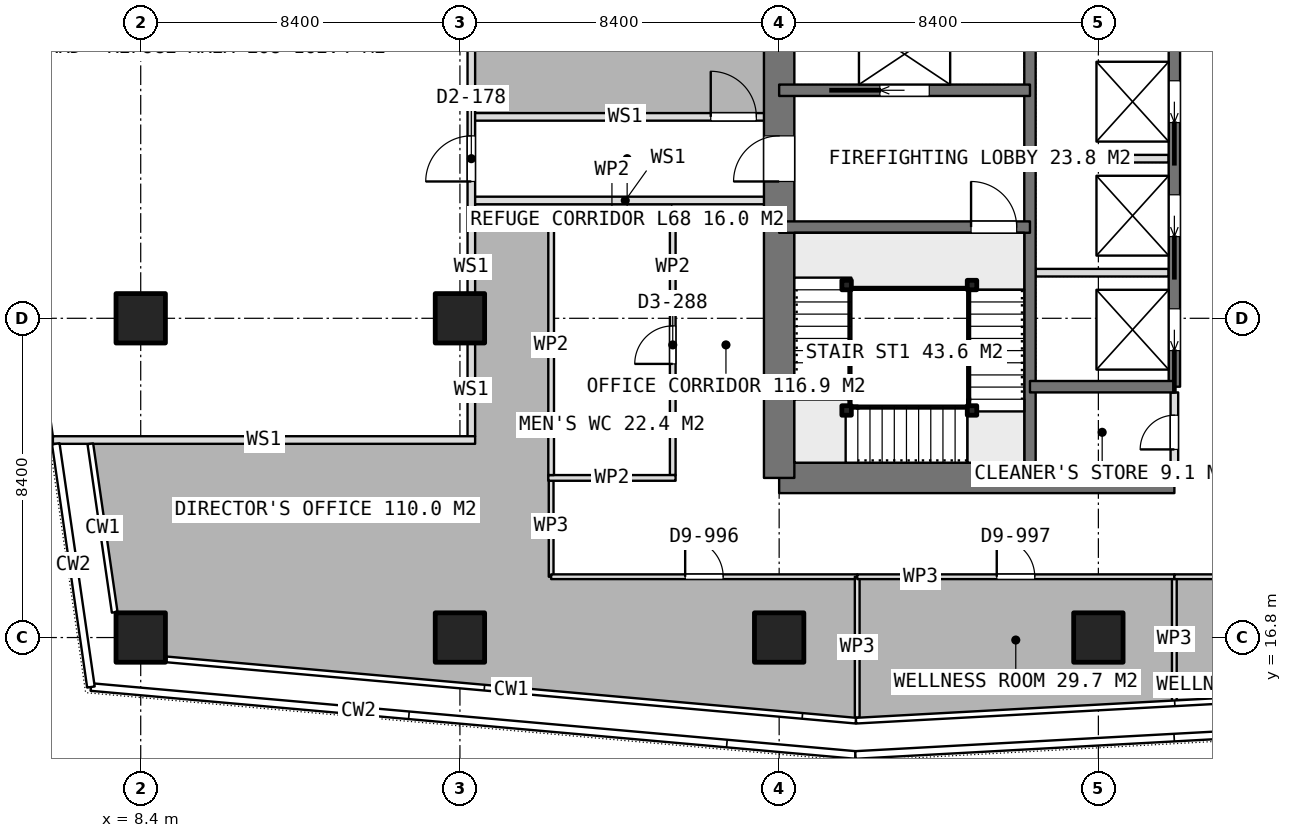
"""IFC4 building model, lengths in metres.
Left out: names, types, materials, properties, quantities, classifications, styles, units other than length and angle.
Written with IfcOpenShell. Run it as: python <this file> out.ifc"""

import sys

from ifc_helpers import new_model, si_unit, direction, frame, frame_2d, origin, origin_2d, place, context, subcontext, project, spatial, rectangle, extrude, element, fill, save


model = new_model("IFC4")
c1 = context("Model", 3, precision=1e-05, world=origin(), true_north=direction((0.0, 1.0)))
c2 = subcontext(c1, "Body", "Model", "MODEL_VIEW")
j1 = project(units=[si_unit("LENGTHUNIT", "METRE"), si_unit("PLANEANGLEUNIT", "RADIAN")], contexts=[c1])
p1 = place(None, origin())
s1 = spatial("IfcSite", under=j1, at=p1, CompositionType="ELEMENT")
p2 = place(p1, origin())
s2 = spatial("IfcBuilding", under=s1, at=p2, CompositionType="ELEMENT")
p3 = place(p2, frame((0.0, 0.0, 268.85)))
s3 = spatial("IfcBuildingStorey", under=s2, at=p3, CompositionType="ELEMENT", Elevation=268.85)
p4 = place(p3, frame((25.2, 21.0, 0.0), z_axis=(0.0, 0.0, 1.0), x_axis=(1.0, 0.0, 0.0)))
e1 = element("IfcWall", 1, at=p4, inside=s3, PredefinedType="SHEAR", context=c2, shape_type="SweptSolid", body=[
    extrude(rectangle(XDim=10.4, YDim=0.8, at=frame_2d((5.2, 0.0))), origin(), (0.0, 0.0, 1.0), 3.75),
])
p5 = place(p3, frame((25.2, 21.0, 0.0), z_axis=(0.0, 0.0, 1.0), x_axis=(0.0, 1.0, 0.0)))
e2 = element("IfcWall", 2, at=p5, inside=s3, PredefinedType="SHEAR", context=c2, shape_type="SweptSolid", body=[
    extrude(rectangle(XDim=25.2, YDim=0.8, at=frame_2d((12.6, 0.0))), origin(), (0.0, 0.0, 1.0), 3.75),
])
p6 = place(p5, frame((7.8, 0.0, 0.0)))
e3 = element("IfcOpeningElement", 3, at=p6, cuts=e2, PredefinedType="OPENING", context=c2, shape_type="SweptSolid", body=[
    extrude(rectangle(XDim=1.2, YDim=2.1, at=frame_2d((0.6, 1.05))), frame((0.0, 0.41, 0.0), z_axis=(0.0, -1.0, 0.0), x_axis=(1.0, 0.0, 0.0)), (0.0, 0.0, 1.0), 0.82),
])
p7 = place(p5, frame((14.25, 0.0, 0.0)))
e4 = element("IfcOpeningElement", 4, at=p7, cuts=e2, PredefinedType="OPENING", context=c2, shape_type="SweptSolid", body=[
    extrude(rectangle(XDim=0.9, YDim=2.1, at=frame_2d((0.45, 1.05))), frame((0.0, 0.41, 0.0), z_axis=(0.0, -1.0, 0.0), x_axis=(1.0, 0.0, 0.0)), (0.0, 0.0, 1.0), 0.82),
])
p8 = place(p5, frame((16.85, 0.0, 0.0)))
e5 = element("IfcOpeningElement", 5, at=p8, cuts=e2, PredefinedType="OPENING", context=c2, shape_type="SweptSolid", body=[
    extrude(rectangle(XDim=0.9, YDim=2.1, at=frame_2d((0.45, 1.05))), frame((0.0, 0.41, 0.0), z_axis=(0.0, -1.0, 0.0), x_axis=(1.0, 0.0, 0.0)), (0.0, 0.0, 1.0), 0.82),
])
p9 = place(p5, frame((18.95, 0.0, 0.0)))
e6 = element("IfcOpeningElement", 6, at=p9, cuts=e2, PredefinedType="OPENING", context=c2, shape_type="SweptSolid", body=[
    extrude(rectangle(XDim=1.2, YDim=2.1, at=frame_2d((0.6, 1.05))), frame((0.0, 0.41, 0.0), z_axis=(0.0, -1.0, 0.0), x_axis=(1.0, 0.0, 0.0)), (0.0, 0.0, 1.0), 0.82),
])
p10 = place(p3, frame((31.8, 21.0, 0.0), z_axis=(0.0, 0.0, 1.0), x_axis=(0.0, 1.0, 0.0)))
e7 = element("IfcWall", 7, at=p10, inside=s3, PredefinedType="SHEAR", context=c2, shape_type="SweptSolid", body=[
    extrude(rectangle(XDim=25.2, YDim=0.3, at=frame_2d((12.6, 0.0))), origin(), (0.0, 0.0, 1.0), 3.75),
])
p11 = place(p3, frame((35.6, 23.4, 0.0), z_axis=(0.0, 0.0, 1.0), x_axis=(0.0, 1.0, 0.0)))
e8 = element("IfcWall", 8, at=p11, inside=s3, PredefinedType="SHEAR", context=c2, shape_type="SweptSolid", body=[
    extrude(rectangle(XDim=18.0, YDim=0.3, at=frame_2d((9.0, 0.0))), origin(), (0.0, 0.0, 1.0), 3.75),
])
p12 = place(p11, frame((0.95, 0.0, 0.0)))
e9 = element("IfcOpeningElement", 9, at=p12, cuts=e8, PredefinedType="OPENING", context=c2, shape_type="SweptSolid", body=[
    extrude(rectangle(XDim=1.1, YDim=2.1, at=frame_2d((0.55, 1.05))), frame((0.0, 0.16, 0.0), z_axis=(0.0, -1.0, 0.0), x_axis=(1.0, 0.0, 0.0)), (0.0, 0.0, 1.0), 0.32),
])
p13 = place(p11, frame((3.95, 0.0, 0.0)))
e10 = element("IfcOpeningElement", 10, at=p13, cuts=e8, PredefinedType="OPENING", context=c2, shape_type="SweptSolid", body=[
    extrude(rectangle(XDim=1.1, YDim=2.1, at=frame_2d((0.55, 1.05))), frame((0.0, 0.16, 0.0), z_axis=(0.0, -1.0, 0.0), x_axis=(1.0, 0.0, 0.0)), (0.0, 0.0, 1.0), 0.32),
])
p14 = place(p11, frame((6.95, 0.0, 0.0)))
e11 = element("IfcOpeningElement", 11, at=p14, cuts=e8, PredefinedType="OPENING", context=c2, shape_type="SweptSolid", body=[
    extrude(rectangle(XDim=1.1, YDim=2.1, at=frame_2d((0.55, 1.05))), frame((0.0, 0.16, 0.0), z_axis=(0.0, -1.0, 0.0), x_axis=(1.0, 0.0, 0.0)), (0.0, 0.0, 1.0), 0.32),
])
p15 = place(p11, frame((9.95, 0.0, 0.0)))
e12 = element("IfcOpeningElement", 12, at=p15, cuts=e8, PredefinedType="OPENING", context=c2, shape_type="SweptSolid", body=[
    extrude(rectangle(XDim=1.1, YDim=2.1, at=frame_2d((0.55, 1.05))), frame((0.0, 0.16, 0.0), z_axis=(0.0, -1.0, 0.0), x_axis=(1.0, 0.0, 0.0)), (0.0, 0.0, 1.0), 0.32),
])
p16 = place(p11, frame((12.95, 0.0, 0.0)))
e13 = element("IfcOpeningElement", 13, at=p16, cuts=e8, PredefinedType="OPENING", context=c2, shape_type="SweptSolid", body=[
    extrude(rectangle(XDim=1.1, YDim=2.1, at=frame_2d((0.55, 1.05))), frame((0.0, 0.16, 0.0), z_axis=(0.0, -1.0, 0.0), x_axis=(1.0, 0.0, 0.0)), (0.0, 0.0, 1.0), 0.32),
])
p17 = place(p11, frame((15.95, 0.0, 0.0)))
e14 = element("IfcOpeningElement", 14, at=p17, cuts=e8, PredefinedType="OPENING", context=c2, shape_type="SweptSolid", body=[
    extrude(rectangle(XDim=1.1, YDim=2.1, at=frame_2d((0.55, 1.05))), frame((0.0, 0.16, 0.0), z_axis=(0.0, -1.0, 0.0), x_axis=(1.0, 0.0, 0.0)), (0.0, 0.0, 1.0), 0.32),
])
p18 = place(p3, frame((31.8, 23.4, 0.0), z_axis=(0.0, 0.0, 1.0), x_axis=(1.0, 0.0, 0.0)))
e15 = element("IfcWall", 15, at=p18, inside=s3, PredefinedType="SHEAR", context=c2, shape_type="SweptSolid", body=[
    extrude(rectangle(XDim=3.8, YDim=0.3, at=frame_2d((1.9, 0.0))), origin(), (0.0, 0.0, 1.0), 3.75),
])
p19 = place(p3, frame((25.2, 27.6, 0.0), z_axis=(0.0, 0.0, 1.0), x_axis=(1.0, 0.0, 0.0)))
e16 = element("IfcWall", 16, at=p19, inside=s3, PredefinedType="SHEAR", context=c2, shape_type="SweptSolid", body=[
    extrude(rectangle(XDim=6.6, YDim=0.3, at=frame_2d((3.3, 0.0))), origin(), (0.0, 0.0, 1.0), 3.75),
])
p20 = place(p19, frame((5.05, 0.0, 0.0)))
e17 = element("IfcOpeningElement", 17, at=p20, cuts=e16, PredefinedType="OPENING", context=c2, shape_type="SweptSolid", body=[
    extrude(rectangle(XDim=1.2, YDim=2.1, at=frame_2d((0.6, 1.05))), frame((0.0, 0.16, 0.0), z_axis=(0.0, -1.0, 0.0), x_axis=(1.0, 0.0, 0.0)), (0.0, 0.0, 1.0), 0.32),
])
p21 = place(p3, frame((25.2, 31.2, 0.0), z_axis=(0.0, 0.0, 1.0), x_axis=(1.0, 0.0, 0.0)))
e18 = element("IfcWall", 18, at=p21, inside=s3, PredefinedType="SHEAR", context=c2, shape_type="SweptSolid", body=[
    extrude(rectangle(XDim=6.6, YDim=0.3, at=frame_2d((3.3, 0.0))), origin(), (0.0, 0.0, 1.0), 3.75),
])
p22 = place(p21, frame((2.65, 0.0, 0.0)))
e19 = element("IfcOpeningElement", 19, at=p22, cuts=e18, PredefinedType="OPENING", context=c2, shape_type="SweptSolid", body=[
    extrude(rectangle(XDim=1.3, YDim=2.1, at=frame_2d((0.65, 1.05))), frame((0.0, 0.16, 0.0), z_axis=(0.0, -1.0, 0.0), x_axis=(1.0, 0.0, 0.0)), (0.0, 0.0, 1.0), 0.32),
])
for number, where, z_axis, x_axis in (
    (20, (8.4, 16.8, 0.0), (0.0, 0.0, 1.0), (1.0, 0.0, 0.0)),
    (21, (8.4, 25.2, 0.0), (0.0, 0.0, 1.0), (1.0, 0.0, 0.0)),
    (22, (16.8, 16.8, 0.0), (0.0, 0.0, 1.0), (1.0, 0.0, 0.0)),
    (23, (16.8, 25.2, 0.0), (0.0, 0.0, 1.0), (1.0, 0.0, 0.0)),
    (24, (25.2, 16.8, 0.0), (0.0, 0.0, 1.0), (1.0, 0.0, 0.0)),
    (25, (33.6, 16.8, 0.0), (0.0, 0.0, 1.0), (1.0, 0.0, 0.0)),
):
    element("IfcColumn", number, at=place(p3, frame(where, z_axis=z_axis, x_axis=x_axis)), inside=s3, PredefinedType="COLUMN", context=c2, shape_type="SweptSolid", body=[
        extrude(rectangle(XDim=1.3, YDim=1.3, at=origin_2d()), origin(), (0.0, 0.0, 1.0), 3.75),
    ])
for number, where, z_axis, x_axis in (
    (26, (31.95, 26.4, 0.0), (0.0, 0.0, 1.0), (1.0, 0.0, 0.0)),
    (27, (31.95, 29.4, 0.0), (0.0, 0.0, 1.0), (1.0, 0.0, 0.0)),
):
    element("IfcWall", number, at=place(p3, frame(where, z_axis=z_axis, x_axis=x_axis)), inside=s3, PredefinedType="PARTITIONING", context=c2, shape_type="SweptSolid", body=[
        extrude(rectangle(XDim=3.5, YDim=0.2, at=frame_2d((1.75, 0.0))), origin(), (0.0, 0.0, 1.0), 3.5),
    ])
p23 = place(p3, frame((35.6, 21.4, 0.0), z_axis=(0.0, 0.0, 1.0), x_axis=(0.0, 1.0, 0.0)))
e28 = element("IfcWall", 28, at=p23, inside=s3, PredefinedType="PARTITIONING", context=c2, shape_type="SweptSolid", body=[
    extrude(rectangle(XDim=1.85, YDim=0.2, at=frame_2d((0.925, 0.0))), origin(), (0.0, 0.0, 1.0), 3.5),
])
p24 = place(p23, frame((0.35, 0.0, 0.0)))
e29 = element("IfcOpeningElement", 29, at=p24, cuts=e28, PredefinedType="OPENING", context=c2, shape_type="SweptSolid", body=[
    extrude(rectangle(XDim=0.9, YDim=2.1, at=frame_2d((0.45, 1.05))), frame((0.0, 0.11, 0.0), z_axis=(0.0, -1.0, 0.0), x_axis=(1.0, 0.0, 0.0)), (0.0, 0.0, 1.0), 0.22),
])
for number, where, z_axis, x_axis in (
    (30, (19.125, 21.0, 0.0), (0.0, 0.0, 1.0), (1.0, 0.0, 0.0)),
    (31, (19.125, 28.0, 0.0), (0.0, 0.0, 1.0), (1.0, 0.0, 0.0)),
):
    element("IfcWall", number, at=place(p3, frame(where, z_axis=z_axis, x_axis=x_axis)), inside=s3, PredefinedType="PARTITIONING", context=c2, shape_type="SweptSolid", body=[
        extrude(rectangle(XDim=3.35, YDim=0.15, at=frame_2d((1.675, 0.0))), origin(), (0.0, 0.0, 1.0), 3.5),
    ])
p25 = place(p3, frame((19.2, 21.075, 0.0), z_axis=(0.0, 0.0, 1.0), x_axis=(0.0, 1.0, 0.0)))
e32 = element("IfcWall", 32, at=p25, inside=s3, PredefinedType="PARTITIONING", context=c2, shape_type="SweptSolid", body=[
    extrude(rectangle(XDim=6.85, YDim=0.15, at=frame_2d((3.425, 0.0))), origin(), (0.0, 0.0, 1.0), 3.5),
])
p26 = place(p3, frame((22.4, 21.075, 0.0), z_axis=(0.0, 0.0, 1.0), x_axis=(0.0, 1.0, 0.0)))
e33 = element("IfcWall", 33, at=p26, inside=s3, PredefinedType="PARTITIONING", context=c2, shape_type="SweptSolid", body=[
    extrude(rectangle(XDim=6.85, YDim=0.15, at=frame_2d((3.425, 0.0))), origin(), (0.0, 0.0, 1.0), 3.5),
])
p27 = place(p26, frame((2.925, 0.0, 0.0)))
e34 = element("IfcOpeningElement", 34, at=p27, cuts=e33, PredefinedType="OPENING", context=c2, shape_type="SweptSolid", body=[
    extrude(rectangle(XDim=1.0, YDim=2.1, at=frame_2d((0.5, 1.05))), frame((0.0, 0.085, 0.0), z_axis=(0.0, -1.0, 0.0), x_axis=(1.0, 0.0, 0.0)), (0.0, 0.0, 1.0), 0.17),
])
p28 = place(p3, frame((35.599, 15.119, 0.0), z_axis=(0.0, 0.0, 1.0), x_axis=(0.0, 1.0, 0.0)))
e35 = element("IfcWall", 35, at=p28, inside=s3, PredefinedType="PARTITIONING", context=c2, shape_type="SweptSolid", body=[
    extrude(rectangle(XDim=3.281, YDim=0.125, at=frame_2d((1.641, 0.0))), origin(), (0.0, 0.0, 1.0), 3.5),
])
p29 = place(p3, frame((35.599, 18.4, 0.0), z_axis=(0.0, 0.0, 1.0), x_axis=(1.0, 0.0, 0.0)))
e36 = element("IfcWall", 36, at=p29, inside=s3, PredefinedType="PARTITIONING", context=c2, shape_type="SweptSolid", body=[
    extrude(rectangle(XDim=7.074, YDim=0.125, at=frame_2d((3.537, 0.0))), origin(), (0.0, 0.0, 1.0), 3.5),
])
p30 = place(p29, frame((3.037, 0.0, 0.0)))
e37 = element("IfcOpeningElement", 37, at=p30, cuts=e36, PredefinedType="OPENING", context=c2, shape_type="SweptSolid", body=[
    extrude(rectangle(XDim=1.0, YDim=2.1, at=frame_2d((0.5, 1.05))), frame((0.0, 0.073, 0.0), z_axis=(0.0, -1.0, 0.0), x_axis=(1.0, 0.0, 0.0)), (0.0, 0.0, 1.0), 0.145),
])
p31 = place(p3, frame((19.2, 21.075, 0.0), z_axis=(0.0, 0.0, 1.0), x_axis=(0.0, -1.0, 0.0)))
e38 = element("IfcWall", 38, at=p31, inside=s3, PredefinedType="PARTITIONING", context=c2, shape_type="SweptSolid", body=[
    extrude(rectangle(XDim=2.675, YDim=0.125, at=frame_2d((1.337, 0.0))), origin(), (0.0, 0.0, 1.0), 3.5),
])
p32 = place(p3, frame((19.2, 18.4, 0.0), z_axis=(0.0, 0.0, 1.0), x_axis=(1.0, 0.0, 0.0)))
e39 = element("IfcWall", 39, at=p32, inside=s3, PredefinedType="PARTITIONING", context=c2, shape_type="SweptSolid", body=[
    extrude(rectangle(XDim=8.054, YDim=0.125, at=frame_2d((4.027, 0.0))), origin(), (0.0, 0.0, 1.0), 3.5),
])
p33 = place(p32, frame((3.527, 0.0, 0.0)))
e40 = element("IfcOpeningElement", 40, at=p33, cuts=e39, PredefinedType="OPENING", context=c2, shape_type="SweptSolid", body=[
    extrude(rectangle(XDim=1.0, YDim=2.1, at=frame_2d((0.5, 1.05))), frame((0.0, 0.073, 0.0), z_axis=(0.0, -1.0, 0.0), x_axis=(1.0, 0.0, 0.0)), (0.0, 0.0, 1.0), 0.145),
])
p34 = place(p3, frame((27.254, 18.4, 0.0), z_axis=(0.0, 0.0, 1.0), x_axis=(0.0, -1.0, 0.0)))
e41 = element("IfcWall", 41, at=p34, inside=s3, PredefinedType="PARTITIONING", context=c2, shape_type="SweptSolid", body=[
    extrude(rectangle(XDim=3.705, YDim=0.125, at=frame_2d((1.853, 0.0))), origin(), (0.0, 0.0, 1.0), 3.5),
])
p35 = place(p3, frame((27.255, 18.4, 0.0), z_axis=(0.0, 0.0, 1.0), x_axis=(1.0, 0.0, 0.0)))
e42 = element("IfcWall", 42, at=p35, inside=s3, PredefinedType="PARTITIONING", context=c2, shape_type="SweptSolid", body=[
    extrude(rectangle(XDim=8.343, YDim=0.125, at=frame_2d((4.171, 0.0))), origin(), (0.0, 0.0, 1.0), 3.5),
])
p36 = place(p35, frame((3.671, 0.0, 0.0)))
e43 = element("IfcOpeningElement", 43, at=p36, cuts=e42, PredefinedType="OPENING", context=c2, shape_type="SweptSolid", body=[
    extrude(rectangle(XDim=1.0, YDim=2.1, at=frame_2d((0.5, 1.05))), frame((0.0, 0.073, 0.0), z_axis=(0.0, -1.0, 0.0), x_axis=(1.0, 0.0, 0.0)), (0.0, 0.0, 1.0), 0.145),
])
for number, where, z_axis, x_axis in (
    (44, (30.275, 26.075, 0.0), (0.0, 0.0, 1.0), (1.0, 0.0, 0.0)),
    (45, (30.275, 22.775, 0.0), (0.0, 0.0, 1.0), (1.0, 0.0, 0.0)),
    (46, (26.975, 22.775, 0.0), (0.0, 0.0, 1.0), (1.0, 0.0, 0.0)),
    (47, (26.975, 26.075, 0.0), (0.0, 0.0, 1.0), (1.0, 0.0, 0.0)),
):
    element("IfcColumn", number, at=place(p3, frame(where, z_axis=z_axis, x_axis=x_axis)), inside=s3, PredefinedType="COLUMN", context=c2, shape_type="SweptSolid", body=[
        extrude(rectangle(XDim=0.25, YDim=0.25, at=origin_2d()), origin(), (0.0, 0.0, 1.0), 3.75),
    ])
p37 = place(p3, frame((17.1, 22.097, 0.0), z_axis=(0.0, 0.0, 1.0), x_axis=(0.0, 1.0, 0.0)))
e48 = element("IfcWall", 48, at=p37, inside=s3, PredefinedType="PARTITIONING", context=c2, shape_type="SweptSolid", body=[
    extrude(rectangle(XDim=2.453, YDim=0.2, at=frame_2d((1.227, 0.0))), origin(), (0.0, 0.0, 1.0), 3.5),
])
p38 = place(p3, frame((17.1, 25.85, 0.0), z_axis=(0.0, 0.0, 1.0), x_axis=(0.0, 1.0, 0.0)))
e49 = element("IfcWall", 49, at=p38, inside=s3, PredefinedType="PARTITIONING", context=c2, shape_type="SweptSolid", body=[
    extrude(rectangle(XDim=7.1, YDim=0.2, at=frame_2d((3.55, 0.0))), origin(), (0.0, 0.0, 1.0), 3.5),
])
p39 = place(p38, frame((2.95, 0.0, 0.0)))
e50 = element("IfcOpeningElement", 50, at=p39, cuts=e49, PredefinedType="OPENING", context=c2, shape_type="SweptSolid", body=[
    extrude(rectangle(XDim=1.2, YDim=2.1, at=frame_2d((0.6, 1.05))), frame((0.0, 0.11, 0.0), z_axis=(0.0, -1.0, 0.0), x_axis=(1.0, 0.0, 0.0)), (0.0, 0.0, 1.0), 0.22),
])
p40 = place(p3, frame((6.089, 21.997, 0.0), z_axis=(0.0, 0.0, 1.0), x_axis=(1.0, 0.0, 0.0)))
e51 = element("IfcWall", 51, at=p40, inside=s3, PredefinedType="PARTITIONING", context=c2, shape_type="SweptSolid", body=[
    extrude(rectangle(XDim=11.111, YDim=0.2, at=frame_2d((5.555, 0.0))), origin(), (0.0, 0.0, 1.0), 3.5),
])
p41 = place(p3, frame((17.1, 30.5, 0.0), z_axis=(0.0, 0.0, 1.0), x_axis=(1.0, 0.0, 0.0)))
e52 = element("IfcWall", 52, at=p41, inside=s3, PredefinedType="PARTITIONING", context=c2, shape_type="SweptSolid", body=[
    extrude(rectangle(XDim=8.1, YDim=0.2, at=frame_2d((4.05, 0.0))), origin(), (0.0, 0.0, 1.0), 3.5),
])
p42 = place(p41, frame((6.3, 0.0, 0.0)))
e53 = element("IfcOpeningElement", 53, at=p42, cuts=e52, PredefinedType="OPENING", context=c2, shape_type="SweptSolid", body=[
    extrude(rectangle(XDim=1.2, YDim=2.1, at=frame_2d((0.6, 1.05))), frame((0.0, 0.11, 0.0), z_axis=(0.0, -1.0, 0.0), x_axis=(1.0, 0.0, 0.0)), (0.0, 0.0, 1.0), 0.22),
])
p43 = place(p3, frame((17.1, 28.3, 0.0), z_axis=(0.0, 0.0, 1.0), x_axis=(1.0, 0.0, 0.0)))
e54 = element("IfcWall", 54, at=p43, inside=s3, PredefinedType="PARTITIONING", context=c2, shape_type="SweptSolid", body=[
    extrude(rectangle(XDim=8.1, YDim=0.2, at=frame_2d((4.05, 0.0))), origin(), (0.0, 0.0, 1.0), 3.5),
])
p44 = place(p6, origin())
e55 = element("IfcDoor", 55, at=p44, inside=s3, OperationType="SINGLE_SWING_LEFT", PredefinedType="DOOR", context=c2, shape_type="SweptSolid", body=[
    extrude(rectangle(XDim=1.2, YDim=2.1, at=frame_2d((0.6, 1.05))), frame((0.0, 0.025, 0.0), z_axis=(0.0, -1.0, 0.0), x_axis=(1.0, 0.0, 0.0)), (0.0, 0.0, 1.0), 0.05),
])
fill(e3, e55)
p45 = place(p24, origin())
e56 = element("IfcDoor", 56, at=p45, inside=s3, OperationType="SINGLE_SWING_LEFT", PredefinedType="DOOR", context=c2, shape_type="SweptSolid", body=[
    extrude(rectangle(XDim=0.9, YDim=2.1, at=frame_2d((0.45, 1.05))), frame((0.0, 0.025, 0.0), z_axis=(0.0, -1.0, 0.0), x_axis=(1.0, 0.0, 0.0)), (0.0, 0.0, 1.0), 0.05),
])
fill(e29, e56)
p46 = place(p12, origin())
e57 = element("IfcDoor", 57, at=p46, inside=s3, OperationType="SLIDING_TO_LEFT", PredefinedType="USERDEFINED", context=c2, shape_type="SweptSolid", body=[
    extrude(rectangle(XDim=1.1, YDim=2.1, at=frame_2d((0.55, 1.05))), frame((0.0, 0.025, 0.0), z_axis=(0.0, -1.0, 0.0), x_axis=(1.0, 0.0, 0.0)), (0.0, 0.0, 1.0), 0.05),
])
fill(e9, e57)
p47 = place(p13, origin())
e58 = element("IfcDoor", 58, at=p47, inside=s3, OperationType="SLIDING_TO_LEFT", PredefinedType="USERDEFINED", context=c2, shape_type="SweptSolid", body=[
    extrude(rectangle(XDim=1.1, YDim=2.1, at=frame_2d((0.55, 1.05))), frame((0.0, 0.025, 0.0), z_axis=(0.0, -1.0, 0.0), x_axis=(1.0, 0.0, 0.0)), (0.0, 0.0, 1.0), 0.05),
])
fill(e10, e58)
p48 = place(p14, origin())
e59 = element("IfcDoor", 59, at=p48, inside=s3, OperationType="SLIDING_TO_LEFT", PredefinedType="USERDEFINED", context=c2, shape_type="SweptSolid", body=[
    extrude(rectangle(XDim=1.1, YDim=2.1, at=frame_2d((0.55, 1.05))), frame((0.0, 0.025, 0.0), z_axis=(0.0, -1.0, 0.0), x_axis=(1.0, 0.0, 0.0)), (0.0, 0.0, 1.0), 0.05),
])
fill(e11, e59)
p49 = place(p22, origin())
e60 = element("IfcDoor", 60, at=p49, inside=s3, OperationType="SLIDING_TO_LEFT", PredefinedType="USERDEFINED", context=c2, shape_type="SweptSolid", body=[
    extrude(rectangle(XDim=1.3, YDim=2.1, at=frame_2d((0.65, 1.05))), frame((0.0, 0.025, 0.0), z_axis=(0.0, -1.0, 0.0), x_axis=(1.0, 0.0, 0.0)), (0.0, 0.0, 1.0), 0.05),
])
fill(e19, e60)
p50 = place(p27, origin())
e61 = element("IfcDoor", 61, at=p50, inside=s3, OperationType="SINGLE_SWING_LEFT", PredefinedType="DOOR", context=c2, shape_type="SweptSolid", body=[
    extrude(rectangle(XDim=1.0, YDim=2.1, at=frame_2d((0.5, 1.05))), frame((0.0, 0.025, 0.0), z_axis=(0.0, -1.0, 0.0), x_axis=(1.0, 0.0, 0.0)), (0.0, 0.0, 1.0), 0.05),
])
fill(e34, e61)
p51 = place(p33, origin())
e62 = element("IfcDoor", 62, at=p51, inside=s3, OperationType="SINGLE_SWING_LEFT", PredefinedType="DOOR", context=c2, shape_type="SweptSolid", body=[
    extrude(rectangle(XDim=1.0, YDim=2.1, at=frame_2d((0.5, 1.05))), frame((0.0, 0.025, 0.0), z_axis=(0.0, -1.0, 0.0), x_axis=(1.0, 0.0, 0.0)), (0.0, 0.0, 1.0), 0.05),
])
fill(e40, e62)
p52 = place(p36, origin())
e63 = element("IfcDoor", 63, at=p52, inside=s3, OperationType="SINGLE_SWING_LEFT", PredefinedType="DOOR", context=c2, shape_type="SweptSolid", body=[
    extrude(rectangle(XDim=1.0, YDim=2.1, at=frame_2d((0.5, 1.05))), frame((0.0, 0.025, 0.0), z_axis=(0.0, -1.0, 0.0), x_axis=(1.0, 0.0, 0.0)), (0.0, 0.0, 1.0), 0.05),
])
fill(e43, e63)
p53 = place(p20, origin())
e64 = element("IfcDoor", 64, at=p53, inside=s3, OperationType="SINGLE_SWING_RIGHT", PredefinedType="DOOR", context=c2, shape_type="SweptSolid", body=[
    extrude(rectangle(XDim=1.2, YDim=2.1, at=frame_2d((0.6, 1.05))), frame((0.0, 0.025, 0.0), z_axis=(0.0, -1.0, 0.0), x_axis=(1.0, 0.0, 0.0)), (0.0, 0.0, 1.0), 0.05),
])
fill(e17, e64)
p54 = place(p39, origin())
e65 = element("IfcDoor", 65, at=p54, inside=s3, OperationType="SINGLE_SWING_LEFT", PredefinedType="DOOR", context=c2, shape_type="SweptSolid", body=[
    extrude(rectangle(XDim=1.2, YDim=2.1, at=frame_2d((0.6, 1.05))), frame((0.0, 0.025, 0.0), z_axis=(0.0, -1.0, 0.0), x_axis=(1.0, 0.0, 0.0)), (0.0, 0.0, 1.0), 0.05),
])
fill(e50, e65)
p55 = place(p42, origin())
e66 = element("IfcDoor", 66, at=p55, inside=s3, OperationType="SINGLE_SWING_LEFT", PredefinedType="DOOR", context=c2, shape_type="SweptSolid", body=[
    extrude(rectangle(XDim=1.2, YDim=2.1, at=frame_2d((0.6, 1.05))), frame((0.0, 0.025, 0.0), z_axis=(0.0, -1.0, 0.0), x_axis=(1.0, 0.0, 0.0)), (0.0, 0.0, 1.0), 0.05),
])
fill(e53, e66)
save(model, sys.argv[1])
